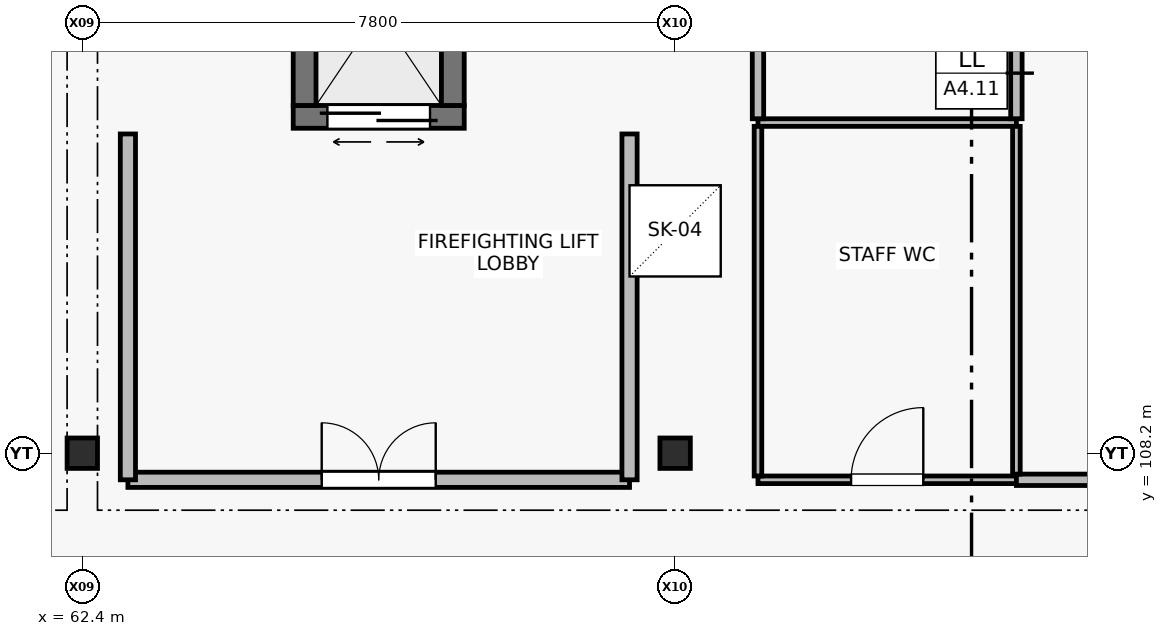
"""IFC4 building model, lengths in metres.
Left out: names, types, materials, properties, quantities, classifications, styles, units other than length and angle.
Written with IfcOpenShell. Run it as: python <this file> out.ifc"""

import sys

from ifc_helpers import new_model, si_unit, direction, frame, frame_2d, origin, origin_2d, place, context, subcontext, project, spatial, rectangle, extrude, element, fill, save


model = new_model("IFC4")
c1 = context("Model", 3, precision=1e-05, world=origin(), true_north=direction((0.0, 1.0)))
c2 = subcontext(c1, "Body", "Model", "MODEL_VIEW")
j1 = project(units=[si_unit("LENGTHUNIT", "METRE"), si_unit("PLANEANGLEUNIT", "RADIAN")], contexts=[c1])
p1 = place(None, origin())
s1 = spatial("IfcSite", under=j1, at=p1, CompositionType="ELEMENT")
p2 = place(p1, origin())
s2 = spatial("IfcBuilding", under=s1, at=p2, CompositionType="ELEMENT")
p3 = place(p2, frame((0.0, 0.0, 23.1)))
s3 = spatial("IfcBuildingStorey", under=s2, at=p3, CompositionType="ELEMENT", Elevation=23.1)
for number, where, z_axis, x_axis in (
    (1, (62.4, 108.2, 0.0), (0.0, 0.0, 1.0), (1.0, 0.0, 0.0)),
    (2, (70.2, 108.2, 0.0), (0.0, 0.0, 1.0), (1.0, 0.0, 0.0)),
):
    element("IfcColumn", number, at=place(p3, frame(where, z_axis=z_axis, x_axis=x_axis)), inside=s3, PredefinedType="COLUMN", context=c2, shape_type="SweptSolid", body=[
        extrude(rectangle(XDim=0.4, YDim=0.4, at=origin_2d()), origin(), (0.0, 0.0, 1.0), 4.2),
    ])
p4 = place(p3, frame((65.175, 112.625, 0.0), z_axis=(0.0, 0.0, 1.0), x_axis=(1.0, 0.0, 0.0)))
e3 = element("IfcWall", 3, at=p4, inside=s3, PredefinedType="SHEAR", context=c2, shape_type="SweptSolid", body=[
    extrude(rectangle(XDim=2.25, YDim=0.3, at=frame_2d((1.125, 0.0))), origin(), (0.0, 0.0, 1.0), 3.94),
])
p5 = place(p4, frame((0.45, 0.0, 0.0)))
e4 = element("IfcOpeningElement", 4, at=p5, cuts=e3, PredefinedType="OPENING", context=c2, shape_type="SweptSolid", body=[
    extrude(rectangle(XDim=1.35, YDim=2.3, at=frame_2d((0.675, 1.15))), frame((0.0, 0.16, 0.0), z_axis=(0.0, -1.0, 0.0), x_axis=(1.0, 0.0, 0.0)), (0.0, 0.0, 1.0), 0.32),
])
for number, where, z_axis, x_axis in (
    (5, (65.325, 115.225, 0.0), (0.0, 0.0, 1.0), (0.0, -1.0, 0.0)),
    (6, (67.275, 112.775, 0.0), (0.0, 0.0, 1.0), (0.0, 1.0, 0.0)),
):
    element("IfcWall", number, at=place(p3, frame(where, z_axis=z_axis, x_axis=x_axis)), inside=s3, PredefinedType="SHEAR", context=c2, shape_type="SweptSolid", body=[
        extrude(rectangle(XDim=2.45, YDim=0.3, at=frame_2d((1.225, 0.0))), origin(), (0.0, 0.0, 1.0), 3.94),
    ])
p6 = place(p3, frame((63.0, 107.85, 0.0), z_axis=(0.0, 0.0, 1.0), x_axis=(1.0, 0.0, 0.0)))
e7 = element("IfcWall", 7, at=p6, inside=s3, PredefinedType="SOLIDWALL", context=c2, shape_type="SweptSolid", body=[
    extrude(rectangle(XDim=6.6, YDim=0.2, at=frame_2d((3.3, 0.0))), origin(), (0.0, 0.0, 1.0), 3.94),
])
p7 = place(p6, frame((2.55, 0.0, 0.0)))
e8 = element("IfcOpeningElement", 8, at=p7, cuts=e7, PredefinedType="OPENING", context=c2, shape_type="SweptSolid", body=[
    extrude(rectangle(XDim=1.5, YDim=2.2, at=frame_2d((0.75, 1.1))), frame((0.0, 0.11, 0.0), z_axis=(0.0, -1.0, 0.0), x_axis=(1.0, 0.0, 0.0)), (0.0, 0.0, 1.0), 0.22),
])
for number, where, z_axis, x_axis in (
    (9, (63.0, 112.4, 0.0), (0.0, 0.0, 1.0), (0.0, -1.0, 0.0)),
    (10, (69.6, 107.85, 0.0), (0.0, 0.0, 1.0), (0.0, 1.0, 0.0)),
):
    element("IfcWall", number, at=place(p3, frame(where, z_axis=z_axis, x_axis=x_axis)), inside=s3, PredefinedType="SOLIDWALL", context=c2, shape_type="SweptSolid", body=[
        extrude(rectangle(XDim=4.55, YDim=0.2, at=frame_2d((2.275, 0.0))), origin(), (0.0, 0.0, 1.0), 3.94),
    ])
p8 = place(p3, frame((71.29, 107.85, 0.0), z_axis=(0.0, 0.0, 1.0), x_axis=(1.0, 0.0, 0.0)))
e11 = element("IfcWall", 11, at=p8, inside=s3, PredefinedType="PARTITIONING", context=c2, shape_type="SweptSolid", body=[
    extrude(rectangle(XDim=3.4, YDim=0.1, at=frame_2d((1.7, 0.0))), origin(), (0.0, 0.0, 1.0), 3.94),
])
p9 = place(p8, frame((1.225, 0.0, 0.0)))
e12 = element("IfcOpeningElement", 12, at=p9, cuts=e11, PredefinedType="OPENING", context=c2, shape_type="SweptSolid", body=[
    extrude(rectangle(XDim=0.95, YDim=2.1, at=frame_2d((0.475, 1.05))), frame((0.0, 0.06, 0.0), z_axis=(0.0, -1.0, 0.0), x_axis=(1.0, 0.0, 0.0)), (0.0, 0.0, 1.0), 0.12),
])
p10 = place(p3, frame((71.29, 112.55, 0.0), z_axis=(0.0, 0.0, 1.0), x_axis=(1.0, 0.0, 0.0)))
e13 = element("IfcWall", 13, at=p10, inside=s3, PredefinedType="PARTITIONING", context=c2, shape_type="SweptSolid", body=[
    extrude(rectangle(XDim=3.4, YDim=0.1, at=frame_2d((1.7, 0.0))), origin(), (0.0, 0.0, 1.0), 3.94),
])
p11 = place(p3, frame((74.69, 107.85, 0.0), z_axis=(0.0, 0.0, 1.0), x_axis=(1.0, 0.0, 0.0)))
e14 = element("IfcWall", 14, at=p11, inside=s3, PredefinedType="PARTITIONING", context=c2, shape_type="SweptSolid", body=[
    extrude(rectangle(XDim=3.58, YDim=0.15, at=frame_2d((1.79, 0.0))), origin(), (0.0, 0.0, 1.0), 3.94),
])
p12 = place(p11, frame((1.24, 0.0, 0.0)))
e15 = element("IfcOpeningElement", 15, at=p12, cuts=e14, PredefinedType="OPENING", context=c2, shape_type="SweptSolid", body=[
    extrude(rectangle(XDim=1.1, YDim=2.15, at=frame_2d((0.55, 1.075))), frame((0.0, 0.085, 0.0), z_axis=(0.0, -1.0, 0.0), x_axis=(1.0, 0.0, 0.0)), (0.0, 0.0, 1.0), 0.17),
])
p13 = place(p3, frame((71.29, 107.9, 0.0), z_axis=(0.0, 0.0, 1.0), x_axis=(0.0, 1.0, 0.0)))
e16 = element("IfcWall", 16, at=p13, inside=s3, PredefinedType="PARTITIONING", context=c2, shape_type="SweptSolid", body=[
    extrude(rectangle(XDim=4.6, YDim=0.1, at=frame_2d((2.3, 0.0))), origin(), (0.0, 0.0, 1.0), 3.94),
])
p14 = place(p3, frame((74.69, 107.925, 0.0), z_axis=(0.0, 0.0, 1.0), x_axis=(0.0, 1.0, 0.0)))
e17 = element("IfcWall", 17, at=p14, inside=s3, PredefinedType="PARTITIONING", context=c2, shape_type="SweptSolid", body=[
    extrude(rectangle(XDim=4.575, YDim=0.1, at=frame_2d((2.288, 0.0))), origin(), (0.0, 0.0, 1.0), 3.94),
])
for number, where, z_axis, x_axis in (
    (18, (74.69, 112.6, 0.0), (0.0, 0.0, 1.0), (0.0, 1.0, 0.0)),
    (19, (71.29, 112.6, 0.0), (0.0, 0.0, 1.0), (0.0, 1.0, 0.0)),
):
    element("IfcWall", number, at=place(p3, frame(where, z_axis=z_axis, x_axis=x_axis)), inside=s3, PredefinedType="PARTITIONING", context=c2, shape_type="SweptSolid", body=[
        extrude(rectangle(XDim=3.21, YDim=0.15, at=frame_2d((1.605, 0.0))), origin(), (0.0, 0.0, 1.0), 3.94),
    ])
p15 = place(p2, frame((0.0, 0.0, 27.3)))
p16 = place(p15, frame((46.8, 106.25, 0.54), z_axis=(0.0, 0.05530385343, 0.998469570791), x_axis=(1.0, 0.0, 0.0)))
p17 = place(p16, frame((23.4, 4.883, 0.01)))
p18 = place(p17, frame((0.0, 0.0, -0.01)))
e20 = element("IfcWindow", 20, at=p18, inside=s3, PartitioningType="SINGLE_PANEL", PredefinedType="SKYLIGHT", context=c2, shape_type="SweptSolid", body=[
    extrude(rectangle(XDim=1.2, YDim=1.2, at=origin_2d()), origin(), (0.0, 0.0, -1.0), 0.05),
])
p19 = place(p5, origin())
e21 = element("IfcDoor", 21, at=p19, inside=s3, OperationType="DOUBLE_DOOR_SLIDING", PredefinedType="DOOR", context=c2, shape_type="SweptSolid", body=[
    extrude(rectangle(XDim=1.35, YDim=2.3, at=frame_2d((0.675, 1.15))), frame((0.0, 0.025, 0.0), z_axis=(0.0, -1.0, 0.0), x_axis=(1.0, 0.0, 0.0)), (0.0, 0.0, 1.0), 0.05),
])
fill(e4, e21)
p20 = place(p7, origin())
e22 = element("IfcDoor", 22, at=p20, inside=s3, OperationType="DOUBLE_DOOR_SINGLE_SWING", PredefinedType="DOOR", context=c2, shape_type="SweptSolid", body=[
    extrude(rectangle(XDim=1.5, YDim=2.2, at=frame_2d((0.75, 1.1))), frame((0.0, 0.025, 0.0), z_axis=(0.0, -1.0, 0.0), x_axis=(1.0, 0.0, 0.0)), (0.0, 0.0, 1.0), 0.05),
])
fill(e8, e22)
p21 = place(p9, origin())
e23 = element("IfcDoor", 23, at=p21, inside=s3, OperationType="SINGLE_SWING_RIGHT", PredefinedType="DOOR", context=c2, shape_type="SweptSolid", body=[
    extrude(rectangle(XDim=0.95, YDim=2.1, at=frame_2d((0.475, 1.05))), frame((0.0, 0.025, 0.0), z_axis=(0.0, -1.0, 0.0), x_axis=(1.0, 0.0, 0.0)), (0.0, 0.0, 1.0), 0.05),
])
fill(e12, e23)
save(model, sys.argv[1])
